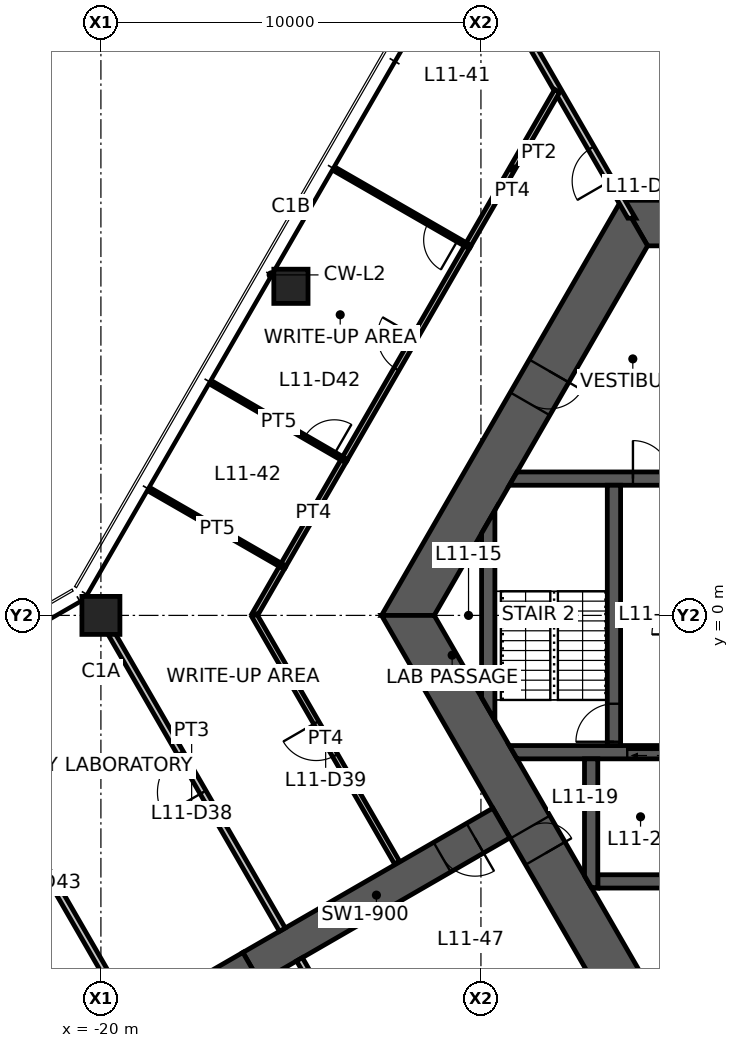
"""IFC4 building model, lengths in metres.
Left out: names, types, materials, properties, quantities, classifications, styles, units other than length and angle.
Written with IfcOpenShell. Run it as: python <this file> out.ifc"""

import sys

from ifc_helpers import new_model, si_unit, direction, frame, frame_2d, origin, origin_2d, place, context, subcontext, project, spatial, polyline, rectangle, hollow_rectangle, outline, extrude, element, fill, save


model = new_model("IFC4")
c1 = context("Model", 3, precision=1e-05, world=origin(), true_north=direction((0.0, 1.0)))
c2 = subcontext(c1, "Body", "Model", "MODEL_VIEW")
j1 = project(units=[si_unit("LENGTHUNIT", "METRE"), si_unit("PLANEANGLEUNIT", "RADIAN")], contexts=[c1])
p1 = place(None, origin())
s1 = spatial("IfcSite", under=j1, at=p1, CompositionType="ELEMENT")
p2 = place(p1, origin())
s2 = spatial("IfcBuilding", under=s1, at=p2, CompositionType="ELEMENT")
p3 = place(p2, frame((0.0, 0.0, 43.6)))
s3 = spatial("IfcBuildingStorey", under=s2, at=p3, CompositionType="ELEMENT", Elevation=43.6)
p4 = place(p3, frame((-20.0, 0.0, 0.0), z_axis=(0.0, 0.0, 1.0), x_axis=(1.0, 0.0, 0.0)))
e1 = element("IfcColumn", 1, at=p4, inside=s3, PredefinedType="COLUMN", context=c2, shape_type="SweptSolid", body=[
    extrude(hollow_rectangle(XDim=1.0, YDim=1.0, WallThickness=0.06, at=origin_2d()), origin(), (0.0, 0.0, 1.0), 4.2),
])
p5 = place(p3, frame((-15.0, 8.66, 0.0), z_axis=(0.0, 0.0, 1.0), x_axis=(1.0, 0.0, 0.0)))
e2 = element("IfcColumn", 2, at=p5, inside=s3, PredefinedType="COLUMN", context=c2, shape_type="SweptSolid", body=[
    extrude(hollow_rectangle(XDim=0.9, YDim=0.9, WallThickness=0.05, at=origin_2d()), origin(), (0.0, 0.0, 1.0), 4.2),
])
p6 = place(p3, frame((5.961, 10.325, 0.0), z_axis=(0.0, 0.0, 1.0), x_axis=(-1.0, 0.0, 0.0)))
e3 = element("IfcWall", 3, at=p6, inside=s3, PredefinedType="SHEAR", context=c2, shape_type="SweptSolid", body=[
    extrude(outline(polyline([(-0.346, -0.6), (4.574, -0.6), (5.474, -0.6), (6.449, -0.6), (7.349, -0.6), (12.269, -0.6), (11.576, 0.6), (7.349, 0.6), (6.449, 0.6), (5.474, 0.6), (4.574, 0.6), (0.346, 0.6), (-0.346, -0.6)])), origin(), (0.0, 0.0, 1.0), 4.2),
])
p7 = place(p6, frame((6.449, 0.0, 0.0)))
e4 = element("IfcOpeningElement", 4, at=p7, cuts=e3, PredefinedType="OPENING", context=c2, shape_type="SweptSolid", body=[
    extrude(rectangle(XDim=0.9, YDim=2.1, at=frame_2d((0.45, 1.05))), frame((0.0, 0.61, 0.0), z_axis=(0.0, -1.0, 0.0), x_axis=(1.0, 0.0, 0.0)), (0.0, 0.0, 1.0), 1.22),
])
p8 = place(p6, frame((4.574, 0.0, 0.0)))
e5 = element("IfcOpeningElement", 5, at=p8, cuts=e3, PredefinedType="OPENING", context=c2, shape_type="SweptSolid", body=[
    extrude(rectangle(XDim=0.9, YDim=2.1, at=frame_2d((0.45, 1.05))), frame((0.0, 0.61, 0.0), z_axis=(0.0, -1.0, 0.0), x_axis=(1.0, 0.0, 0.0)), (0.0, 0.0, 1.0), 1.22),
])
p9 = place(p3, frame((-5.961, 10.325, 0.0), z_axis=(0.0, 0.0, 1.0), x_axis=(-0.500004296715, -0.866022923061, 0.0)))
e6 = element("IfcWall", 6, at=p9, inside=s3, PredefinedType="SHEAR", context=c2, shape_type="SweptSolid", body=[
    extrude(outline(polyline([(-0.346, -0.6), (4.494, -0.6), (5.494, -0.6), (12.269, -0.6), (11.576, 0.6), (5.494, 0.6), (4.494, 0.6), (0.346, 0.6), (-0.346, -0.6)])), origin(), (0.0, 0.0, 1.0), 4.2),
])
p10 = place(p9, frame((4.494, 0.0, 0.0)))
e7 = element("IfcOpeningElement", 7, at=p10, cuts=e6, PredefinedType="OPENING", context=c2, shape_type="SweptSolid", body=[
    extrude(rectangle(XDim=1.0, YDim=2.1, at=frame_2d((0.5, 1.05))), frame((0.0, 0.61, 0.0), z_axis=(0.0, -1.0, 0.0), x_axis=(1.0, 0.0, 0.0)), (0.0, 0.0, 1.0), 1.22),
])
p11 = place(p3, frame((-11.922, 0.0, 0.0), z_axis=(0.0, 0.0, 1.0), x_axis=(0.500004296715, -0.866022923061, 0.0)))
e8 = element("IfcWall", 8, at=p11, inside=s3, PredefinedType="SHEAR", context=c2, shape_type="SweptSolid", body=[
    extrude(outline(polyline([(-0.346, -0.6), (6.431, -0.6), (7.231, -0.6), (12.269, -0.6), (11.576, 0.6), (7.231, 0.6), (6.431, 0.6), (0.346, 0.6), (-0.346, -0.6)])), origin(), (0.0, 0.0, 1.0), 4.2),
])
p12 = place(p11, frame((6.431, 0.0, 0.0)))
e9 = element("IfcOpeningElement", 9, at=p12, cuts=e8, PredefinedType="OPENING", context=c2, shape_type="SweptSolid", body=[
    extrude(rectangle(XDim=0.8, YDim=2.1, at=frame_2d((0.4, 1.05))), frame((0.0, 0.61, 0.0), z_axis=(0.0, -1.0, 0.0), x_axis=(1.0, 0.0, 0.0)), (0.0, 0.0, 1.0), 1.22),
])
p13 = place(p3, frame((-9.461, -5.462, 0.0), z_axis=(0.0, 0.0, 1.0), x_axis=(-0.866019116917, -0.500010889016, 0.0)))
e10 = element("IfcWall", 10, at=p13, inside=s3, PredefinedType="SHEAR", context=c2, shape_type="SweptSolid", body=[
    extrude(rectangle(XDim=7.595, YDim=0.9, at=frame_2d((3.798, 0.0))), origin(), (0.0, 0.0, 1.0), 4.2),
])
p14 = place(p13, frame((0.8, 0.0, 0.0)))
e11 = element("IfcOpeningElement", 11, at=p14, cuts=e10, PredefinedType="OPENING", context=c2, shape_type="SweptSolid", body=[
    extrude(rectangle(XDim=1.0, YDim=2.1, at=frame_2d((0.5, 1.05))), frame((0.0, 0.46, 0.0), z_axis=(0.0, -1.0, 0.0), x_axis=(1.0, 0.0, 0.0)), (0.0, 0.0, 1.0), 0.92),
])
p15 = place(p3, frame((-16.039, -9.26, 0.0), z_axis=(0.0, 0.0, 1.0), x_axis=(-0.866024837091, -0.50000098154, 0.0)))
e12 = element("IfcWall", 12, at=p15, inside=s3, PredefinedType="SHEAR", context=c2, shape_type="SweptSolid", body=[
    extrude(rectangle(XDim=13.0, YDim=0.9, at=frame_2d((6.5, 0.0))), origin(), (0.0, 0.0, 1.0), 4.2),
])
p16 = place(p3, frame((-9.151, 3.6, 0.0), z_axis=(0.0, 0.0, 1.0), x_axis=(1.0, 0.0, 0.0)))
e13 = element("IfcWall", 13, at=p16, inside=s3, PredefinedType="SHEAR", context=c2, shape_type="SweptSolid", body=[
    extrude(outline(polyline([(-0.101, -0.175), (3.151, -0.175), (4.151, -0.175), (7.726, -0.175), (7.726, 0.175), (4.151, 0.175), (3.151, 0.175), (0.101, 0.175), (-0.101, -0.175)])), origin(), (0.0, 0.0, 1.0), 4.2),
])
p17 = place(p16, frame((3.151, 0.0, 0.0)))
e14 = element("IfcOpeningElement", 14, at=p17, cuts=e13, PredefinedType="OPENING", context=c2, shape_type="SweptSolid", body=[
    extrude(rectangle(XDim=1.0, YDim=2.1, at=frame_2d((0.5, 1.05))), frame((0.0, 0.185, 0.0), z_axis=(0.0, -1.0, 0.0), x_axis=(1.0, 0.0, 0.0)), (0.0, 0.0, 1.0), 0.37),
])
p18 = place(p3, frame((-9.151, -3.6, 0.0), z_axis=(0.0, 0.0, 1.0), x_axis=(1.0, 0.0, 0.0)))
e15 = element("IfcWall", 15, at=p18, inside=s3, PredefinedType="SHEAR", context=c2, shape_type="SweptSolid", body=[
    extrude(outline(polyline([(0.101, -0.175), (3.001, -0.175), (4.301, -0.175), (7.726, -0.175), (7.726, 0.175), (4.301, 0.175), (3.001, 0.175), (-0.101, 0.175), (0.101, -0.175)])), origin(), (0.0, 0.0, 1.0), 4.2),
])
p19 = place(p18, frame((3.001, 0.0, 0.0)))
e16 = element("IfcOpeningElement", 16, at=p19, cuts=e15, PredefinedType="OPENING", context=c2, shape_type="SweptSolid", body=[
    extrude(rectangle(XDim=1.3, YDim=2.1, at=frame_2d((0.65, 1.05))), frame((0.0, 0.185, 0.0), z_axis=(0.0, -1.0, 0.0), x_axis=(1.0, 0.0, 0.0)), (0.0, 0.0, 1.0), 0.37),
])
p20 = place(p3, frame((-6.5, -3.425, 0.0), z_axis=(0.0, 0.0, 1.0), x_axis=(0.0, 1.0, 0.0)))
e17 = element("IfcWall", 17, at=p20, inside=s3, PredefinedType="SHEAR", context=c2, shape_type="SweptSolid", body=[
    extrude(rectangle(XDim=6.85, YDim=0.35, at=frame_2d((3.425, 0.0))), origin(), (0.0, 0.0, 1.0), 4.2),
])
p21 = place(p20, frame((0.1, 0.0, 0.0)))
e18 = element("IfcOpeningElement", 18, at=p21, cuts=e17, PredefinedType="OPENING", context=c2, shape_type="SweptSolid", body=[
    extrude(rectangle(XDim=1.0, YDim=2.1, at=frame_2d((0.5, 1.05))), frame((0.0, 0.185, 0.0), z_axis=(0.0, -1.0, 0.0), x_axis=(1.0, 0.0, 0.0)), (0.0, 0.0, 1.0), 0.37),
])
p22 = place(p3, frame((-6.925, -7.0, 0.0), z_axis=(0.0, 0.0, 1.0), x_axis=(1.0, 0.0, 0.0)))
e19 = element("IfcWall", 19, at=p22, inside=s3, PredefinedType="SHEAR", context=c2, shape_type="SweptSolid", body=[
    extrude(rectangle(XDim=2.25, YDim=0.35, at=frame_2d((1.125, 0.0))), origin(), (0.0, 0.0, 1.0), 4.2),
])
p23 = place(p3, frame((-7.1, -3.775, 0.0), z_axis=(0.0, 0.0, 1.0), x_axis=(0.0, -1.0, 0.0)))
e20 = element("IfcWall", 20, at=p23, inside=s3, PredefinedType="SHEAR", context=c2, shape_type="SweptSolid", body=[
    extrude(outline(polyline([(0.0, -0.175), (3.074, -0.175), (3.377, 0.0), (3.4, 0.175), (0.0, 0.175), (0.0, -0.175)])), origin(), (0.0, 0.0, 1.0), 4.2),
])
p24 = place(p3, frame((-9.808, -2.462, 0.0), z_axis=(0.0, 0.0, 1.0), x_axis=(0.0, 1.0, 0.0)))
e21 = element("IfcWall", 21, at=p24, inside=s3, PredefinedType="SHEAR", context=c2, shape_type="SweptSolid", body=[
    extrude(outline(polyline([(-0.303, -0.175), (5.228, -0.175), (4.621, 0.175), (0.303, 0.175), (-0.303, -0.175)])), origin(), (0.0, 0.0, 1.0), 4.2),
])
p25 = place(p3, frame((-6.035, 10.453, 0.0), z_axis=(0.0, 0.0, 1.0), x_axis=(-0.499993402427, 0.866029212861, 0.0)))
e22 = element("IfcWall", 22, at=p25, inside=s3, PredefinedType="PARTITIONING", context=c2, shape_type="SweptSolid", body=[
    extrude(outline(polyline([(-0.051, -0.087), (1.129, -0.087), (2.129, -0.087), (7.93, -0.087), (7.93, 0.087), (2.129, 0.087), (1.129, 0.087), (0.051, 0.087), (-0.051, -0.087)])), origin(), (0.0, 0.0, 1.0), 3.33),
])
p26 = place(p25, frame((1.129, 0.0, 0.0)))
e23 = element("IfcOpeningElement", 23, at=p26, cuts=e22, PredefinedType="OPENING", context=c2, shape_type="SweptSolid", body=[
    extrude(rectangle(XDim=1.0, YDim=2.1, at=frame_2d((0.5, 1.05))), frame((0.0, 0.098, 0.0), z_axis=(0.0, -1.0, 0.0), x_axis=(1.0, 0.0, 0.0)), (0.0, 0.0, 1.0), 0.195),
])
p27 = place(p3, frame((-15.225, -8.271, 0.0), z_axis=(0.0, 0.0, 1.0), x_axis=(-0.499993908199, 0.866028920859, 0.0)))
e24 = element("IfcWall", 24, at=p27, inside=s3, PredefinedType="PARTITIONING", context=c2, shape_type="SweptSolid", body=[
    extrude(rectangle(XDim=9.55, YDim=0.175, at=frame_2d((4.775, 0.0))), origin(), (0.0, 0.0, 1.0), 3.238),
])
p28 = place(p27, frame((4.175, 0.0, 0.0)))
e25 = element("IfcOpeningElement", 25, at=p28, cuts=e24, PredefinedType="OPENING", context=c2, shape_type="SweptSolid", body=[
    extrude(rectangle(XDim=1.2, YDim=2.1, at=frame_2d((0.6, 1.05))), frame((0.0, 0.098, 0.0), z_axis=(0.0, -1.0, 0.0), x_axis=(1.0, 0.0, 0.0)), (0.0, 0.0, 1.0), 0.195),
])
p29 = place(p3, frame((-10.352, 9.719, 0.0), z_axis=(0.0, 0.0, 1.0), x_axis=(0.499985273446, 0.866033905998, 0.0)))
e26 = element("IfcWall", 26, at=p29, inside=s3, PredefinedType="PARTITIONING", context=c2, shape_type="SweptSolid", body=[
    extrude(rectangle(XDim=4.718, YDim=0.15, at=frame_2d((2.359, 0.0))), origin(), (0.0, 0.0, 1.0), 3.23),
])
p30 = place(p3, frame((-15.222, 1.285, 0.0), z_axis=(0.0, 0.0, 1.0), x_axis=(0.499969057507, 0.866043267704, 0.0)))
e27 = element("IfcWall", 27, at=p30, inside=s3, PredefinedType="PARTITIONING", context=c2, shape_type="SweptSolid", body=[
    extrude(rectangle(XDim=3.257, YDim=0.15, at=frame_2d((1.628, 0.0))), origin(), (0.0, 0.0, 1.0), 3.23),
])
p31 = place(p3, frame((-15.964, 0.0, 0.0), z_axis=(0.0, 0.0, 1.0), x_axis=(0.499901701094, 0.866082149246, 0.0)))
e28 = element("IfcWall", 28, at=p31, inside=s3, PredefinedType="PARTITIONING", context=c2, shape_type="SweptSolid", body=[
    extrude(rectangle(XDim=1.493, YDim=0.15, at=frame_2d((0.747, 0.0))), origin(), (0.0, 0.0, 1.0), 3.23),
])
p32 = place(p3, frame((-12.208, -6.506, 0.0), z_axis=(0.0, 0.0, 1.0), x_axis=(-0.499984092097, 0.866034588021, 0.0)))
e29 = element("IfcWall", 29, at=p32, inside=s3, PredefinedType="PARTITIONING", context=c2, shape_type="SweptSolid", body=[
    extrude(rectangle(XDim=7.512, YDim=0.15, at=frame_2d((3.756, 0.0))), origin(), (0.0, 0.0, 1.0), 3.23),
])
p33 = place(p32, frame((3.256, 0.0, 0.0)))
e30 = element("IfcOpeningElement", 30, at=p33, cuts=e29, PredefinedType="OPENING", context=c2, shape_type="SweptSolid", body=[
    extrude(rectangle(XDim=1.0, YDim=2.1, at=frame_2d((0.5, 1.05))), frame((0.0, 0.085, 0.0), z_axis=(0.0, -1.0, 0.0), x_axis=(1.0, 0.0, 0.0)), (0.0, 0.0, 1.0), 0.17),
])
p34 = place(p3, frame((-13.598, 4.097, 0.0), z_axis=(0.0, 0.0, 1.0), x_axis=(0.49998791073, 0.866032383415, 0.0)))
e31 = element("IfcWall", 31, at=p34, inside=s3, PredefinedType="PARTITIONING", context=c2, shape_type="SweptSolid", body=[
    extrude(rectangle(XDim=6.502, YDim=0.15, at=frame_2d((3.251, 0.0))), origin(), (0.0, 0.0, 1.0), 3.23),
])
p35 = place(p34, frame((2.751, 0.0, 0.0)))
e32 = element("IfcOpeningElement", 32, at=p35, cuts=e31, PredefinedType="OPENING", context=c2, shape_type="SweptSolid", body=[
    extrude(rectangle(XDim=1.0, YDim=2.1, at=frame_2d((0.5, 1.05))), frame((0.0, 0.085, 0.0), z_axis=(0.0, -1.0, 0.0), x_axis=(1.0, 0.0, 0.0)), (0.0, 0.0, 1.0), 0.17),
])
p36 = place(p3, frame((-10.347, 9.728, 0.0), z_axis=(0.0, 0.0, 1.0), x_axis=(-0.866583023507, 0.499032928142, 0.0)))
e33 = element("IfcWall", 33, at=p36, inside=s3, PredefinedType="PARTITIONING", context=c2, shape_type="SweptSolid", body=[
    extrude(rectangle(XDim=3.975, YDim=0.1, at=frame_2d((1.988, 0.0))), origin(), (0.0, 0.0, 1.0), 3.23),
])
p37 = place(p36, frame((0.3, 0.0, 0.0)))
e34 = element("IfcOpeningElement", 34, at=p37, cuts=e33, PredefinedType="OPENING", context=c2, shape_type="SweptSolid", body=[
    extrude(rectangle(XDim=0.9, YDim=2.1, at=frame_2d((0.45, 1.05))), frame((0.0, 0.06, 0.0), z_axis=(0.0, -1.0, 0.0), x_axis=(1.0, 0.0, 0.0)), (0.0, 0.0, 1.0), 0.12),
])
p38 = place(p3, frame((-15.217, 1.293, 0.0), z_axis=(0.0, 0.0, 1.0), x_axis=(-0.866583023507, 0.499032928142, 0.0)))
e35 = element("IfcWall", 35, at=p38, inside=s3, PredefinedType="PARTITIONING", context=c2, shape_type="SweptSolid", body=[
    extrude(rectangle(XDim=3.975, YDim=0.1, at=frame_2d((1.988, 0.0))), origin(), (0.0, 0.0, 1.0), 3.23),
])
p39 = place(p3, frame((-17.039, 6.089, 0.0), z_axis=(0.0, 0.0, 1.0), x_axis=(0.865455715078, -0.500985434159, 0.0)))
e36 = element("IfcWall", 36, at=p39, inside=s3, PredefinedType="PARTITIONING", context=c2, shape_type="SweptSolid", body=[
    extrude(rectangle(XDim=3.976, YDim=0.1, at=frame_2d((1.988, 0.0))), origin(), (0.0, 0.0, 1.0), 3.23),
])
p40 = place(p39, frame((2.776, 0.0, 0.0)))
e37 = element("IfcOpeningElement", 37, at=p40, cuts=e36, PredefinedType="OPENING", context=c2, shape_type="SweptSolid", body=[
    extrude(rectangle(XDim=0.9, YDim=2.1, at=frame_2d((0.45, 1.05))), frame((0.0, 0.06, 0.0), z_axis=(0.0, -1.0, 0.0), x_axis=(1.0, 0.0, 0.0)), (0.0, 0.0, 1.0), 0.12),
])
p41 = place(p3, frame((-19.209, -10.571, 0.0), z_axis=(0.0, 0.0, 1.0), x_axis=(-0.500005203629, 0.866022399447, 0.0)))
e38 = element("IfcWall", 38, at=p41, inside=s3, PredefinedType="PARTITIONING", context=c2, shape_type="SweptSolid", body=[
    extrude(rectangle(XDim=10.14, YDim=0.175, at=frame_2d((5.07, 0.0))), origin(), (0.0, 0.0, 1.0), 4.03),
])
p42 = place(p41, frame((4.025, 0.0, 0.0)))
e39 = element("IfcOpeningElement", 39, at=p42, cuts=e38, PredefinedType="OPENING", context=c2, shape_type="SweptSolid", body=[
    extrude(rectangle(XDim=1.5, YDim=2.1, at=frame_2d((0.75, 1.05))), frame((0.0, 0.098, 0.0), z_axis=(0.0, -1.0, 0.0), x_axis=(1.0, 0.0, 0.0)), (0.0, 0.0, 1.0), 0.195),
])
p43 = place(p3, frame((-14.775, -9.05, 0.0), z_axis=(0.0, 0.0, 1.0), x_axis=(0.499993908199, -0.866028920859, 0.0)))
e40 = element("IfcWall", 40, at=p43, inside=s3, PredefinedType="PARTITIONING", context=c2, shape_type="SweptSolid", body=[
    extrude(rectangle(XDim=9.55, YDim=0.175, at=frame_2d((4.775, 0.0))), origin(), (0.0, 0.0, 1.0), 3.238),
])
p44 = place(p43, frame((4.175, 0.0, 0.0)))
e41 = element("IfcOpeningElement", 41, at=p44, cuts=e40, PredefinedType="OPENING", context=c2, shape_type="SweptSolid", body=[
    extrude(rectangle(XDim=1.2, YDim=2.1, at=frame_2d((0.6, 1.05))), frame((0.0, 0.098, 0.0), z_axis=(0.0, -1.0, 0.0), x_axis=(1.0, 0.0, 0.0)), (0.0, 0.0, 1.0), 0.195),
])
p45 = place(p12, origin())
e42 = element("IfcDoor", 42, at=p45, inside=s3, OperationType="SINGLE_SWING_RIGHT", PredefinedType="DOOR", context=c2, shape_type="SweptSolid", body=[
    extrude(rectangle(XDim=0.8, YDim=2.1, at=frame_2d((0.4, 1.05))), frame((0.0, 0.025, 0.0), z_axis=(0.0, -1.0, 0.0), x_axis=(1.0, 0.0, 0.0)), (0.0, 0.0, 1.0), 0.05),
])
fill(e9, e42)
p46 = place(p10, origin())
e43 = element("IfcDoor", 43, at=p46, inside=s3, OperationType="SINGLE_SWING_LEFT", PredefinedType="DOOR", context=c2, shape_type="SweptSolid", body=[
    extrude(rectangle(XDim=1.0, YDim=2.1, at=frame_2d((0.5, 1.05))), frame((0.0, 0.025, 0.0), z_axis=(0.0, -1.0, 0.0), x_axis=(1.0, 0.0, 0.0)), (0.0, 0.0, 1.0), 0.05),
])
fill(e7, e43)
p47 = place(p21, origin())
e44 = element("IfcDoor", 44, at=p47, inside=s3, OperationType="SINGLE_SWING_LEFT", PredefinedType="DOOR", context=c2, shape_type="SweptSolid", body=[
    extrude(rectangle(XDim=1.0, YDim=2.1, at=frame_2d((0.5, 1.05))), frame((0.0, 0.025, 0.0), z_axis=(0.0, -1.0, 0.0), x_axis=(1.0, 0.0, 0.0)), (0.0, 0.0, 1.0), 0.05),
])
fill(e18, e44)
p48 = place(p17, origin())
e45 = element("IfcDoor", 45, at=p48, inside=s3, OperationType="SINGLE_SWING_LEFT", PredefinedType="DOOR", context=c2, shape_type="SweptSolid", body=[
    extrude(rectangle(XDim=1.0, YDim=2.1, at=frame_2d((0.5, 1.05))), frame((0.0, 0.025, 0.0), z_axis=(0.0, -1.0, 0.0), x_axis=(1.0, 0.0, 0.0)), (0.0, 0.0, 1.0), 0.05),
])
fill(e14, e45)
p49 = place(p14, origin())
e46 = element("IfcDoor", 46, at=p49, inside=s3, OperationType="SINGLE_SWING_LEFT", PredefinedType="DOOR", context=c2, shape_type="SweptSolid", body=[
    extrude(rectangle(XDim=1.0, YDim=2.1, at=frame_2d((0.5, 1.05))), frame((0.0, 0.025, 0.0), z_axis=(0.0, -1.0, 0.0), x_axis=(1.0, 0.0, 0.0)), (0.0, 0.0, 1.0), 0.05),
])
fill(e11, e46)
p50 = place(p26, origin())
e47 = element("IfcDoor", 47, at=p50, inside=s3, OperationType="SINGLE_SWING_LEFT", PredefinedType="DOOR", context=c2, shape_type="SweptSolid", body=[
    extrude(rectangle(XDim=1.0, YDim=2.1, at=frame_2d((0.5, 1.05))), frame((0.0, 0.025, 0.0), z_axis=(0.0, -1.0, 0.0), x_axis=(1.0, 0.0, 0.0)), (0.0, 0.0, 1.0), 0.05),
])
fill(e23, e47)
p51 = place(p28, origin())
e48 = element("IfcDoor", 48, at=p51, inside=s3, OperationType="DOUBLE_DOOR_SINGLE_SWING", PredefinedType="DOOR", context=c2, shape_type="SweptSolid", body=[
    extrude(rectangle(XDim=1.2, YDim=2.1, at=frame_2d((0.6, 1.05))), frame((0.0, 0.025, 0.0), z_axis=(0.0, -1.0, 0.0), x_axis=(1.0, 0.0, 0.0)), (0.0, 0.0, 1.0), 0.05),
])
fill(e25, e48)
p52 = place(p33, origin())
e49 = element("IfcDoor", 49, at=p52, inside=s3, OperationType="SINGLE_SWING_RIGHT", PredefinedType="DOOR", context=c2, shape_type="SweptSolid", body=[
    extrude(rectangle(XDim=1.0, YDim=2.1, at=frame_2d((0.5, 1.05))), frame((0.0, 0.025, 0.0), z_axis=(0.0, -1.0, 0.0), x_axis=(1.0, 0.0, 0.0)), (0.0, 0.0, 1.0), 0.05),
])
fill(e30, e49)
p53 = place(p35, origin())
e50 = element("IfcDoor", 50, at=p53, inside=s3, OperationType="SINGLE_SWING_RIGHT", PredefinedType="DOOR", context=c2, shape_type="SweptSolid", body=[
    extrude(rectangle(XDim=1.0, YDim=2.1, at=frame_2d((0.5, 1.05))), frame((0.0, 0.025, 0.0), z_axis=(0.0, -1.0, 0.0), x_axis=(1.0, 0.0, 0.0)), (0.0, 0.0, 1.0), 0.05),
])
fill(e32, e50)
p54 = place(p37, origin())
e51 = element("IfcDoor", 51, at=p54, inside=s3, OperationType="SINGLE_SWING_LEFT", PredefinedType="DOOR", context=c2, shape_type="SweptSolid", body=[
    extrude(rectangle(XDim=0.9, YDim=2.1, at=frame_2d((0.45, 1.05))), frame((0.0, 0.025, 0.0), z_axis=(0.0, -1.0, 0.0), x_axis=(1.0, 0.0, 0.0)), (0.0, 0.0, 1.0), 0.05),
])
fill(e34, e51)
p55 = place(p40, origin())
e52 = element("IfcDoor", 52, at=p55, inside=s3, OperationType="SINGLE_SWING_RIGHT", PredefinedType="DOOR", context=c2, shape_type="SweptSolid", body=[
    extrude(rectangle(XDim=0.9, YDim=2.1, at=frame_2d((0.45, 1.05))), frame((0.0, 0.025, 0.0), z_axis=(0.0, -1.0, 0.0), x_axis=(1.0, 0.0, 0.0)), (0.0, 0.0, 1.0), 0.05),
])
fill(e37, e52)
p56 = place(p42, origin())
e53 = element("IfcDoor", 53, at=p56, inside=s3, OperationType="DOUBLE_DOOR_SINGLE_SWING", PredefinedType="DOOR", context=c2, shape_type="SweptSolid", body=[
    extrude(rectangle(XDim=1.5, YDim=2.1, at=frame_2d((0.75, 1.05))), frame((0.0, 0.025, 0.0), z_axis=(0.0, -1.0, 0.0), x_axis=(1.0, 0.0, 0.0)), (0.0, 0.0, 1.0), 0.05),
])
fill(e39, e53)
p57 = place(p19, origin())
e54 = element("IfcDoor", 54, at=p57, inside=s3, OperationType="DOUBLE_DOOR_SLIDING", PredefinedType="DOOR", context=c2, shape_type="SweptSolid", body=[
    extrude(rectangle(XDim=1.3, YDim=2.1, at=frame_2d((0.65, 1.05))), frame((0.0, 0.025, 0.0), z_axis=(0.0, -1.0, 0.0), x_axis=(1.0, 0.0, 0.0)), (0.0, 0.0, 1.0), 0.05),
])
fill(e16, e54)
save(model, sys.argv[1])
